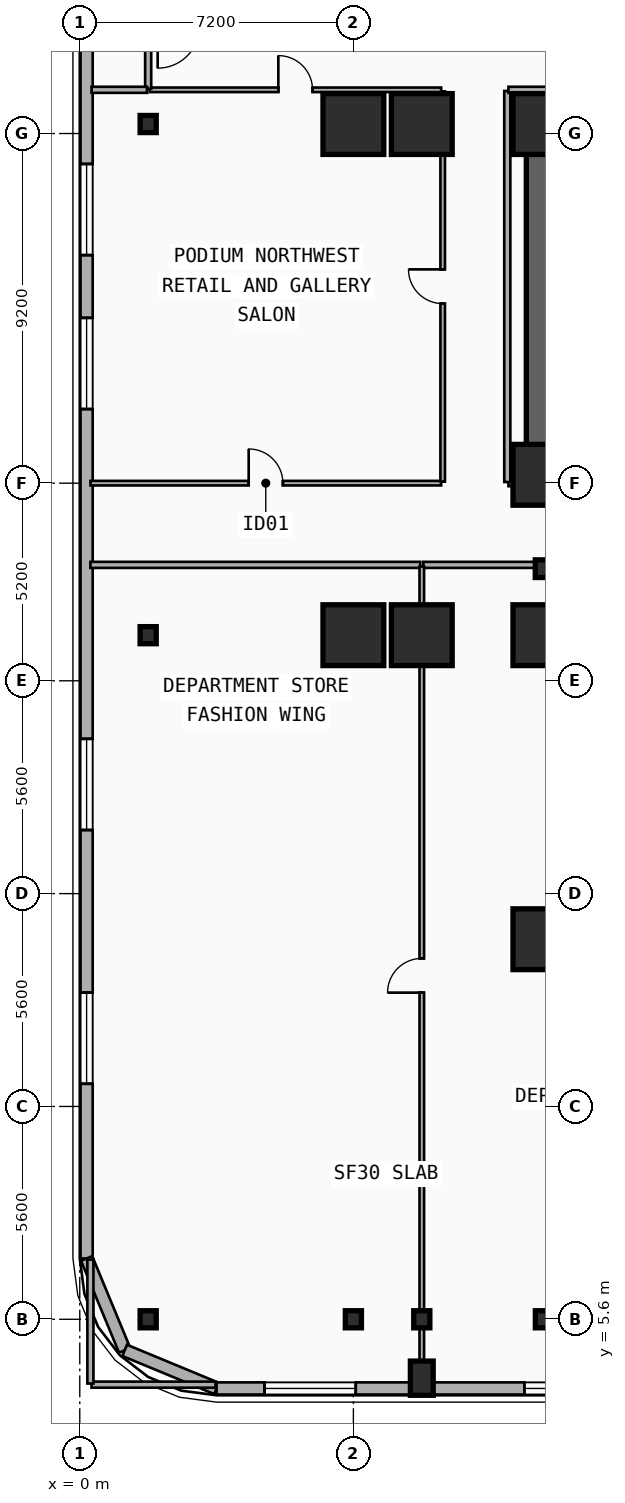
"""IFC4 building model, lengths in metres.
Left out: names, types, materials, properties, quantities, classifications, styles, units other than length and angle.
Written with IfcOpenShell. Run it as: python <this file> out.ifc"""

import sys

from ifc_helpers import new_model, si_unit, direction, frame, frame_2d, origin, origin_2d, place, context, subcontext, project, spatial, rectangle, i_section, extrude, element, fill, save


model = new_model("IFC4")
c1 = context("Model", 3, precision=1e-05, world=origin(), true_north=direction((0.0, 1.0)))
c2 = subcontext(c1, "Body", "Model", "MODEL_VIEW")
j1 = project(units=[si_unit("LENGTHUNIT", "METRE"), si_unit("PLANEANGLEUNIT", "RADIAN")], contexts=[c1])
p1 = place(None, origin())
s1 = spatial("IfcSite", under=j1, at=p1, CompositionType="ELEMENT")
p2 = place(p1, origin())
s2 = spatial("IfcBuilding", under=s1, at=p2, CompositionType="ELEMENT")
p3 = place(p2, frame((0.0, 0.0, 10.4)))
s3 = spatial("IfcBuildingStorey", under=s2, at=p3, CompositionType="ELEMENT", Elevation=10.4)
p4 = place(p3, frame((12.15, 37.05, 0.0), z_axis=(0.0, 0.0, 1.0), x_axis=(1.0, 0.0, 0.0)))
e1 = element("IfcWall", 1, at=p4, inside=s3, PredefinedType="SHEAR", context=c2, shape_type="SweptSolid", body=[
    extrude(rectangle(XDim=33.23, YDim=0.8, at=frame_2d((16.615, 0.0))), origin(), (0.0, 0.0, 1.0), 4.5),
])
p5 = place(p3, frame((21.18, 27.82, 0.0), z_axis=(0.0, 0.0, 1.0), x_axis=(-1.0, 0.0, 0.0)))
e2 = element("IfcWall", 2, at=p5, inside=s3, PredefinedType="SHEAR", context=c2, shape_type="SweptSolid", body=[
    extrude(rectangle(XDim=9.03, YDim=0.8, at=frame_2d((4.515, 0.0))), origin(), (0.0, 0.0, 1.0), 4.5),
])
p6 = place(p5, frame((2.68, 0.0, 0.0)))
e3 = element("IfcOpeningElement", 3, at=p6, cuts=e2, PredefinedType="OPENING", context=c2, shape_type="SweptSolid", body=[
    extrude(rectangle(XDim=1.1, YDim=2.15, at=frame_2d((0.55, 1.075))), frame((0.0, 0.41, 0.0), z_axis=(0.0, -1.0, 0.0), x_axis=(1.0, 0.0, 0.0)), (0.0, 0.0, 1.0), 0.82),
])
p7 = place(p3, frame((12.15, 28.22, 0.0), z_axis=(0.0, 0.0, 1.0), x_axis=(0.0, 1.0, 0.0)))
e4 = element("IfcWall", 4, at=p7, inside=s3, PredefinedType="SHEAR", context=c2, shape_type="SweptSolid", body=[
    extrude(rectangle(XDim=8.43, YDim=0.8, at=frame_2d((4.215, 0.0))), origin(), (0.0, 0.0, 1.0), 4.5),
])
for number, where, z_axis, x_axis in (
    (5, (12.2, 27.82, 0.0), (0.0, 0.0, 1.0), (1.0, 0.0, 0.0)),
    (6, (12.2, 37.05, 0.0), (0.0, 0.0, 1.0), (1.0, 0.0, 0.0)),
):
    element("IfcColumn", number, at=place(p3, frame(where, z_axis=z_axis, x_axis=x_axis)), inside=s3, PredefinedType="COLUMN", context=c2, shape_type="SweptSolid", body=[
        extrude(rectangle(XDim=1.6, YDim=1.6, at=origin_2d()), origin(), (0.0, 0.0, 1.0), 4.5),
    ])
p8 = place(p3, frame((12.2, 25.35, 0.0), z_axis=(0.0, 0.0, 1.0), x_axis=(1.0, 0.0, 0.0)))
e7 = element("IfcColumn", 7, at=p8, inside=s3, PredefinedType="COLUMN", context=c2, shape_type="SweptSolid", body=[
    extrude(i_section(OverallWidth=0.428, OverallDepth=0.465, WebThickness=0.045, FlangeThickness=0.073, FilletRadius=0.015, at=origin_2d()), origin(), (0.0, 0.0, 1.0), 4.5),
])
for number, where, z_axis, x_axis in (
    (8, (1.8, 5.6, 0.0), (0.0, 0.0, 1.0), (1.0, 0.0, 0.0)),
    (9, (1.8, 23.6, 0.0), (0.0, 0.0, 1.0), (1.0, 0.0, 0.0)),
    (10, (1.8, 37.05, 0.0), (0.0, 0.0, 1.0), (1.0, 0.0, 0.0)),
    (11, (7.2, 5.6, 0.0), (0.0, 0.0, 1.0), (1.0, 0.0, 0.0)),
):
    element("IfcColumn", number, at=place(p3, frame(where, z_axis=z_axis, x_axis=x_axis)), inside=s3, PredefinedType="COLUMN", context=c2, shape_type="SweptSolid", body=[
        extrude(i_section(OverallWidth=0.424, OverallDepth=0.45, WebThickness=0.041, FlangeThickness=0.065, FilletRadius=0.015, at=origin_2d()), origin(), (0.0, 0.0, 1.0), 4.5),
    ])
for number, where, z_axis, x_axis in (
    (12, (7.2, 23.6, 0.0), (0.0, 0.0, 1.0), (1.0, 0.0, 0.0)),
    (13, (7.2, 37.05, 0.0), (0.0, 0.0, 1.0), (1.0, 0.0, 0.0)),
):
    element("IfcColumn", number, at=place(p3, frame(where, z_axis=z_axis, x_axis=x_axis)), inside=s3, PredefinedType="COLUMN", context=c2, shape_type="SweptSolid", body=[
        extrude(rectangle(XDim=1.6, YDim=1.6, at=origin_2d()), origin(), (0.0, 0.0, 1.0), 4.5),
    ])
p9 = place(p3, frame((9.0, 5.6, 0.0), z_axis=(0.0, 0.0, 1.0), x_axis=(1.0, 0.0, 0.0)))
e14 = element("IfcColumn", 14, at=p9, inside=s3, PredefinedType="COLUMN", context=c2, shape_type="SweptSolid", body=[
    extrude(i_section(OverallWidth=0.424, OverallDepth=0.45, WebThickness=0.041, FlangeThickness=0.065, FilletRadius=0.015, at=origin_2d()), origin(), (0.0, 0.0, 1.0), 4.5),
])
for number, where, z_axis, x_axis in (
    (15, (9.0, 23.6, 0.0), (0.0, 0.0, 1.0), (1.0, 0.0, 0.0)),
    (16, (9.0, 37.05, 0.0), (0.0, 0.0, 1.0), (1.0, 0.0, 0.0)),
):
    element("IfcColumn", number, at=place(p3, frame(where, z_axis=z_axis, x_axis=x_axis)), inside=s3, PredefinedType="COLUMN", context=c2, shape_type="SweptSolid", body=[
        extrude(rectangle(XDim=1.6, YDim=1.6, at=origin_2d()), origin(), (0.0, 0.0, 1.0), 4.5),
    ])
p10 = place(p3, frame((12.2, 5.6, 0.0), z_axis=(0.0, 0.0, 1.0), x_axis=(1.0, 0.0, 0.0)))
e17 = element("IfcColumn", 17, at=p10, inside=s3, PredefinedType="COLUMN", context=c2, shape_type="SweptSolid", body=[
    extrude(i_section(OverallWidth=0.424, OverallDepth=0.45, WebThickness=0.041, FlangeThickness=0.065, FilletRadius=0.015, at=origin_2d()), origin(), (0.0, 0.0, 1.0), 4.5),
])
for number, where, z_axis, x_axis in (
    (18, (12.2, 15.6, 0.0), (0.0, 0.0, 1.0), (1.0, 0.0, 0.0)),
    (19, (12.2, 23.6, 0.0), (0.0, 0.0, 1.0), (1.0, 0.0, 0.0)),
):
    element("IfcColumn", number, at=place(p3, frame(where, z_axis=z_axis, x_axis=x_axis)), inside=s3, PredefinedType="COLUMN", context=c2, shape_type="SweptSolid", body=[
        extrude(rectangle(XDim=1.6, YDim=1.6, at=origin_2d()), origin(), (0.0, 0.0, 1.0), 4.5),
    ])
p11 = place(p3, frame((9.0, 4.05, 0.0), z_axis=(0.0, 0.0, 1.0), x_axis=(1.0, 0.0, 0.0)))
e20 = element("IfcColumn", 20, at=p11, inside=s3, PredefinedType="PILASTER", context=c2, shape_type="SweptSolid", body=[
    extrude(rectangle(XDim=0.6, YDim=0.9, at=origin_2d()), origin(), (0.0, 0.0, 1.0), 4.5),
])
p12 = place(p3, frame((0.18, 7.2, 0.0), z_axis=(0.0, 0.0, 1.0), x_axis=(0.0, 1.0, 0.0)))
e21 = element("IfcWall", 21, at=p12, inside=s3, PredefinedType="SOLIDWALL", context=c2, shape_type="SweptSolid", body=[
    extrude(rectangle(XDim=34.4, YDim=0.32, at=frame_2d((17.2, 0.0))), origin(), (0.0, 0.0, 1.0), 4.2),
])
p13 = place(p12, frame((22.35, 0.0, 0.9)))
e22 = element("IfcOpeningElement", 22, at=p13, cuts=e21, PredefinedType="OPENING", context=c2, shape_type="SweptSolid", body=[
    extrude(rectangle(XDim=2.4, YDim=1.8, at=frame_2d((1.2, 0.9))), frame((0.0, 0.17, 0.0), z_axis=(0.0, -1.0, 0.0), x_axis=(1.0, 0.0, 0.0)), (0.0, 0.0, 1.0), 0.34),
])
p14 = place(p12, frame((26.4, 0.0, 0.9)))
e23 = element("IfcOpeningElement", 23, at=p14, cuts=e21, PredefinedType="OPENING", context=c2, shape_type="SweptSolid", body=[
    extrude(rectangle(XDim=2.4, YDim=1.8, at=frame_2d((1.2, 0.9))), frame((0.0, 0.17, 0.0), z_axis=(0.0, -1.0, 0.0), x_axis=(1.0, 0.0, 0.0)), (0.0, 0.0, 1.0), 0.34),
])
p15 = place(p12, frame((4.597, 0.0, 0.9)))
e24 = element("IfcOpeningElement", 24, at=p15, cuts=e21, PredefinedType="OPENING", context=c2, shape_type="SweptSolid", body=[
    extrude(rectangle(XDim=2.4, YDim=1.8, at=frame_2d((1.2, 0.9))), frame((0.0, 0.17, 0.0), z_axis=(0.0, -1.0, 0.0), x_axis=(1.0, 0.0, 0.0)), (0.0, 0.0, 1.0), 0.34),
])
p16 = place(p12, frame((11.273, 0.0, 0.9)))
e25 = element("IfcOpeningElement", 25, at=p16, cuts=e21, PredefinedType="OPENING", context=c2, shape_type="SweptSolid", body=[
    extrude(rectangle(XDim=2.4, YDim=1.8, at=frame_2d((1.2, 0.9))), frame((0.0, 0.17, 0.0), z_axis=(0.0, -1.0, 0.0), x_axis=(1.0, 0.0, 0.0)), (0.0, 0.0, 1.0), 0.34),
])
p17 = place(p3, frame((1.182, 4.782, 0.0), z_axis=(0.0, 0.0, 1.0), x_axis=(-0.382700522567, 0.923872453333, 0.0)))
e26 = element("IfcWall", 26, at=p17, inside=s3, PredefinedType="SOLIDWALL", context=c2, shape_type="SweptSolid", body=[
    extrude(rectangle(XDim=2.617, YDim=0.32, at=frame_2d((1.309, 0.0))), origin(), (0.0, 0.0, 1.0), 4.2),
])
p18 = place(p3, frame((3.6, 3.78, 0.0), z_axis=(0.0, 0.0, 1.0), x_axis=(-0.923886112352, 0.382667546838, 0.0)))
e27 = element("IfcWall", 27, at=p18, inside=s3, PredefinedType="SOLIDWALL", context=c2, shape_type="SweptSolid", body=[
    extrude(rectangle(XDim=2.618, YDim=0.32, at=frame_2d((1.309, 0.0))), origin(), (0.0, 0.0, 1.0), 4.2),
])
p19 = place(p3, frame((20.6, 3.78, 0.0), z_axis=(0.0, 0.0, 1.0), x_axis=(-1.0, 0.0, 0.0)))
e28 = element("IfcWall", 28, at=p19, inside=s3, PredefinedType="SOLIDWALL", context=c2, shape_type="SweptSolid", body=[
    extrude(rectangle(XDim=17.0, YDim=0.32, at=frame_2d((8.5, 0.0))), origin(), (0.0, 0.0, 1.0), 4.2),
])
p20 = place(p19, frame((13.338, 0.0, 0.9)))
e29 = element("IfcOpeningElement", 29, at=p20, cuts=e28, PredefinedType="OPENING", context=c2, shape_type="SweptSolid", body=[
    extrude(rectangle(XDim=2.4, YDim=1.8, at=frame_2d((1.2, 0.9))), frame((0.0, 0.17, 0.0), z_axis=(0.0, -1.0, 0.0), x_axis=(1.0, 0.0, 0.0)), (0.0, 0.0, 1.0), 0.34),
])
p21 = place(p19, frame((6.5, 0.0, 0.9)))
e30 = element("IfcOpeningElement", 30, at=p21, cuts=e28, PredefinedType="OPENING", context=c2, shape_type="SweptSolid", body=[
    extrude(rectangle(XDim=2.4, YDim=1.8, at=frame_2d((1.2, 0.9))), frame((0.0, 0.17, 0.0), z_axis=(0.0, -1.0, 0.0), x_axis=(1.0, 0.0, 0.0)), (0.0, 0.0, 1.0), 0.34),
])
p22 = place(p3, frame((0.28, 27.6, 0.0), z_axis=(0.0, 0.0, 1.0), x_axis=(1.0, 0.0, 0.0)))
e31 = element("IfcWall", 31, at=p22, inside=s3, PredefinedType="PARTITIONING", context=c2, shape_type="SweptSolid", body=[
    extrude(rectangle(XDim=9.23, YDim=0.12, at=frame_2d((4.615, 0.0))), origin(), (0.0, 0.0, 1.0), 4.2),
])
p23 = place(p22, frame((4.165, 0.0, 0.0)))
e32 = element("IfcOpeningElement", 32, at=p23, cuts=e31, PredefinedType="OPENING", context=c2, shape_type="SweptSolid", body=[
    extrude(rectangle(XDim=0.9, YDim=2.1, at=frame_2d((0.45, 1.05))), frame((0.0, 0.07, 0.0), z_axis=(0.0, -1.0, 0.0), x_axis=(1.0, 0.0, 0.0)), (0.0, 0.0, 1.0), 0.14),
])
p24 = place(p3, frame((0.28, 25.45, 0.0), z_axis=(0.0, 0.0, 1.0), x_axis=(1.0, 0.0, 0.0)))
e33 = element("IfcWall", 33, at=p24, inside=s3, PredefinedType="PARTITIONING", context=c2, shape_type="SweptSolid", body=[
    extrude(rectangle(XDim=8.68, YDim=0.16, at=frame_2d((4.34, 0.0))), origin(), (0.0, 0.0, 1.0), 4.2),
])
p25 = place(p3, frame((9.04, 25.45, 0.0), z_axis=(0.0, 0.0, 1.0), x_axis=(1.0, 0.0, 0.0)))
e34 = element("IfcWall", 34, at=p25, inside=s3, PredefinedType="PARTITIONING", context=c2, shape_type="SweptSolid", body=[
    extrude(rectangle(XDim=9.72, YDim=0.16, at=frame_2d((4.86, 0.0))), origin(), (0.0, 0.0, 1.0), 3.366),
])
p26 = place(p25, frame((4.36, 0.0, 0.0)))
e35 = element("IfcOpeningElement", 35, at=p26, cuts=e34, PredefinedType="OPENING", context=c2, shape_type="SweptSolid", body=[
    extrude(rectangle(XDim=1.0, YDim=2.15, at=frame_2d((0.5, 1.075))), frame((0.0, 0.09, 0.0), z_axis=(0.0, -1.0, 0.0), x_axis=(1.0, 0.0, 0.0)), (0.0, 0.0, 1.0), 0.18),
])
p27 = place(p3, frame((9.55, 27.64, 0.0), z_axis=(0.0, 0.0, 1.0), x_axis=(0.0, 1.0, 0.0)))
e36 = element("IfcWall", 36, at=p27, inside=s3, PredefinedType="PARTITIONING", context=c2, shape_type="SweptSolid", body=[
    extrude(rectangle(XDim=10.27, YDim=0.12, at=frame_2d((5.135, 0.0))), origin(), (0.0, 0.0, 1.0), 4.2),
])
p28 = place(p27, frame((4.685, 0.0, 0.0)))
e37 = element("IfcOpeningElement", 37, at=p28, cuts=e36, PredefinedType="OPENING", context=c2, shape_type="SweptSolid", body=[
    extrude(rectangle(XDim=0.9, YDim=2.1, at=frame_2d((0.45, 1.05))), frame((0.0, 0.07, 0.0), z_axis=(0.0, -1.0, 0.0), x_axis=(1.0, 0.0, 0.0)), (0.0, 0.0, 1.0), 0.14),
])
p29 = place(p3, frame((1.84, 37.95, 0.0), z_axis=(0.0, 0.0, 1.0), x_axis=(1.0, 0.0, 0.0)))
e38 = element("IfcWall", 38, at=p29, inside=s3, PredefinedType="PARTITIONING", context=c2, shape_type="SweptSolid", body=[
    extrude(rectangle(XDim=7.67, YDim=0.12, at=frame_2d((3.835, 0.0))), origin(), (0.0, 0.0, 1.0), 4.2),
])
p30 = place(p29, frame((3.385, 0.0, 0.0)))
e39 = element("IfcOpeningElement", 39, at=p30, cuts=e38, PredefinedType="OPENING", context=c2, shape_type="SweptSolid", body=[
    extrude(rectangle(XDim=0.9, YDim=2.1, at=frame_2d((0.45, 1.05))), frame((0.0, 0.07, 0.0), z_axis=(0.0, -1.0, 0.0), x_axis=(1.0, 0.0, 0.0)), (0.0, 0.0, 1.0), 0.14),
])
p31 = place(p3, frame((9.0, 3.88, 0.0), z_axis=(0.0, 0.0, 1.0), x_axis=(0.0, 1.0, 0.0)))
e40 = element("IfcWall", 40, at=p31, inside=s3, PredefinedType="PARTITIONING", context=c2, shape_type="SweptSolid", body=[
    extrude(rectangle(XDim=21.53, YDim=0.12, at=frame_2d((10.765, 0.0))), origin(), (0.0, 0.0, 1.0), 3.53),
])
p32 = place(p31, frame((10.315, 0.0, 0.0)))
e41 = element("IfcOpeningElement", 41, at=p32, cuts=e40, PredefinedType="OPENING", context=c2, shape_type="SweptSolid", body=[
    extrude(rectangle(XDim=0.9, YDim=2.1, at=frame_2d((0.45, 1.05))), frame((0.0, 0.07, 0.0), z_axis=(0.0, -1.0, 0.0), x_axis=(1.0, 0.0, 0.0)), (0.0, 0.0, 1.0), 0.14),
])
p33 = place(p3, frame((11.28, 27.6, 0.0), z_axis=(0.0, 0.0, 1.0), x_axis=(1.0, 0.0, 0.0)))
e42 = element("IfcWall", 42, at=p33, inside=s3, PredefinedType="PARTITIONING", context=c2, shape_type="SweptSolid", body=[
    extrude(rectangle(XDim=0.84, YDim=0.16, at=frame_2d((0.42, 0.0))), origin(), (0.0, 0.0, 1.0), 3.172),
])
p34 = place(p3, frame((11.25, 27.63, 0.0), z_axis=(0.0, 0.0, 1.0), x_axis=(0.0, 1.0, 0.0)))
e43 = element("IfcWall", 43, at=p34, inside=s3, PredefinedType="PARTITIONING", context=c2, shape_type="SweptSolid", body=[
    extrude(rectangle(XDim=10.29, YDim=0.16, at=frame_2d((5.145, 0.0))), origin(), (0.0, 0.0, 1.0), 4.2),
])
p35 = place(p3, frame((11.28, 37.95, 0.0), z_axis=(0.0, 0.0, 1.0), x_axis=(1.0, 0.0, 0.0)))
e44 = element("IfcWall", 44, at=p35, inside=s3, PredefinedType="PARTITIONING", context=c2, shape_type="SweptSolid", body=[
    extrude(rectangle(XDim=35.04, YDim=0.16, at=frame_2d((17.52, 0.0))), origin(), (0.0, 0.0, 1.0), 3.53),
])
p36 = place(p3, frame((1.8, 37.98, 0.0), z_axis=(0.0, 0.0, 1.0), x_axis=(0.0, 1.0, 0.0)))
e45 = element("IfcWall", 45, at=p36, inside=s3, PredefinedType="PARTITIONING", context=c2, shape_type="SweptSolid", body=[
    extrude(rectangle(XDim=1.785, YDim=0.16, at=frame_2d((0.893, 0.0))), origin(), (0.0, 0.0, 1.0), 4.2),
])
p37 = place(p3, frame((0.31, 37.95, 0.0), z_axis=(0.0, 0.0, 1.0), x_axis=(1.0, 0.0, 0.0)))
e46 = element("IfcWall", 46, at=p37, inside=s3, PredefinedType="PARTITIONING", context=c2, shape_type="SweptSolid", body=[
    extrude(rectangle(XDim=1.46, YDim=0.16, at=frame_2d((0.73, 0.0))), origin(), (0.0, 0.0, 1.0), 4.2),
])
for number, where, z_axis, x_axis in (
    (47, (0.31, 3.88, 0.0), (0.0, 0.0, 1.0), (1.0, 0.0, 0.0)),
    (48, (0.28, 3.91, 0.0), (0.0, 0.0, 1.0), (0.0, 1.0, 0.0)),
):
    element("IfcWall", number, at=place(p3, frame(where, z_axis=z_axis, x_axis=x_axis)), inside=s3, PredefinedType="PARTITIONING", context=c2, shape_type="SweptSolid", body=[
        extrude(rectangle(XDim=3.26, YDim=0.16, at=frame_2d((1.63, 0.0))), origin(), (0.0, 0.0, 1.0), 4.2),
    ])
p38 = place(p13, origin())
e49 = element("IfcWindow", 49, at=p38, inside=s3, PartitioningType="SINGLE_PANEL", PredefinedType="WINDOW", context=c2, shape_type="SweptSolid", body=[
    extrude(rectangle(XDim=2.4, YDim=1.8, at=frame_2d((1.2, 0.9))), frame((0.0, 0.03, 0.0), z_axis=(0.0, -1.0, 0.0), x_axis=(1.0, 0.0, 0.0)), (0.0, 0.0, 1.0), 0.06),
])
fill(e22, e49)
p39 = place(p14, origin())
e50 = element("IfcWindow", 50, at=p39, inside=s3, PartitioningType="SINGLE_PANEL", PredefinedType="WINDOW", context=c2, shape_type="SweptSolid", body=[
    extrude(rectangle(XDim=2.4, YDim=1.8, at=frame_2d((1.2, 0.9))), frame((0.0, 0.03, 0.0), z_axis=(0.0, -1.0, 0.0), x_axis=(1.0, 0.0, 0.0)), (0.0, 0.0, 1.0), 0.06),
])
fill(e23, e50)
p40 = place(p15, origin())
e51 = element("IfcWindow", 51, at=p40, inside=s3, PartitioningType="SINGLE_PANEL", PredefinedType="WINDOW", context=c2, shape_type="SweptSolid", body=[
    extrude(rectangle(XDim=2.4, YDim=1.8, at=frame_2d((1.2, 0.9))), frame((0.0, 0.03, 0.0), z_axis=(0.0, -1.0, 0.0), x_axis=(1.0, 0.0, 0.0)), (0.0, 0.0, 1.0), 0.06),
])
fill(e24, e51)
p41 = place(p16, origin())
e52 = element("IfcWindow", 52, at=p41, inside=s3, PartitioningType="SINGLE_PANEL", PredefinedType="WINDOW", context=c2, shape_type="SweptSolid", body=[
    extrude(rectangle(XDim=2.4, YDim=1.8, at=frame_2d((1.2, 0.9))), frame((0.0, 0.03, 0.0), z_axis=(0.0, -1.0, 0.0), x_axis=(1.0, 0.0, 0.0)), (0.0, 0.0, 1.0), 0.06),
])
fill(e25, e52)
p42 = place(p20, origin())
e53 = element("IfcWindow", 53, at=p42, inside=s3, PartitioningType="SINGLE_PANEL", PredefinedType="WINDOW", context=c2, shape_type="SweptSolid", body=[
    extrude(rectangle(XDim=2.4, YDim=1.8, at=frame_2d((1.2, 0.9))), frame((0.0, 0.03, 0.0), z_axis=(0.0, -1.0, 0.0), x_axis=(1.0, 0.0, 0.0)), (0.0, 0.0, 1.0), 0.06),
])
fill(e29, e53)
p43 = place(p21, origin())
e54 = element("IfcWindow", 54, at=p43, inside=s3, PartitioningType="SINGLE_PANEL", PredefinedType="WINDOW", context=c2, shape_type="SweptSolid", body=[
    extrude(rectangle(XDim=2.4, YDim=1.8, at=frame_2d((1.2, 0.9))), frame((0.0, 0.03, 0.0), z_axis=(0.0, -1.0, 0.0), x_axis=(1.0, 0.0, 0.0)), (0.0, 0.0, 1.0), 0.06),
])
fill(e30, e54)
p44 = place(p23, origin())
e55 = element("IfcDoor", 55, at=p44, inside=s3, OperationType="SINGLE_SWING_LEFT", PredefinedType="DOOR", context=c2, shape_type="SweptSolid", body=[
    extrude(rectangle(XDim=0.9, YDim=2.1, at=frame_2d((0.45, 1.05))), frame((0.0, 0.025, 0.0), z_axis=(0.0, -1.0, 0.0), x_axis=(1.0, 0.0, 0.0)), (0.0, 0.0, 1.0), 0.05),
])
fill(e32, e55)
p45 = place(p28, origin())
e56 = element("IfcDoor", 56, at=p45, inside=s3, OperationType="SINGLE_SWING_RIGHT", PredefinedType="DOOR", context=c2, shape_type="SweptSolid", body=[
    extrude(rectangle(XDim=0.9, YDim=2.1, at=frame_2d((0.45, 1.05))), frame((0.0, 0.025, 0.0), z_axis=(0.0, -1.0, 0.0), x_axis=(1.0, 0.0, 0.0)), (0.0, 0.0, 1.0), 0.05),
])
fill(e37, e56)
p46 = place(p30, origin())
e57 = element("IfcDoor", 57, at=p46, inside=s3, OperationType="SINGLE_SWING_LEFT", PredefinedType="DOOR", context=c2, shape_type="SweptSolid", body=[
    extrude(rectangle(XDim=0.9, YDim=2.1, at=frame_2d((0.45, 1.05))), frame((0.0, 0.025, 0.0), z_axis=(0.0, -1.0, 0.0), x_axis=(1.0, 0.0, 0.0)), (0.0, 0.0, 1.0), 0.05),
])
fill(e39, e57)
p47 = place(p32, origin())
e58 = element("IfcDoor", 58, at=p47, inside=s3, OperationType="SINGLE_SWING_LEFT", PredefinedType="DOOR", context=c2, shape_type="SweptSolid", body=[
    extrude(rectangle(XDim=0.9, YDim=2.1, at=frame_2d((0.45, 1.05))), frame((0.0, 0.025, 0.0), z_axis=(0.0, -1.0, 0.0), x_axis=(1.0, 0.0, 0.0)), (0.0, 0.0, 1.0), 0.05),
])
fill(e41, e58)
save(model, sys.argv[1])
